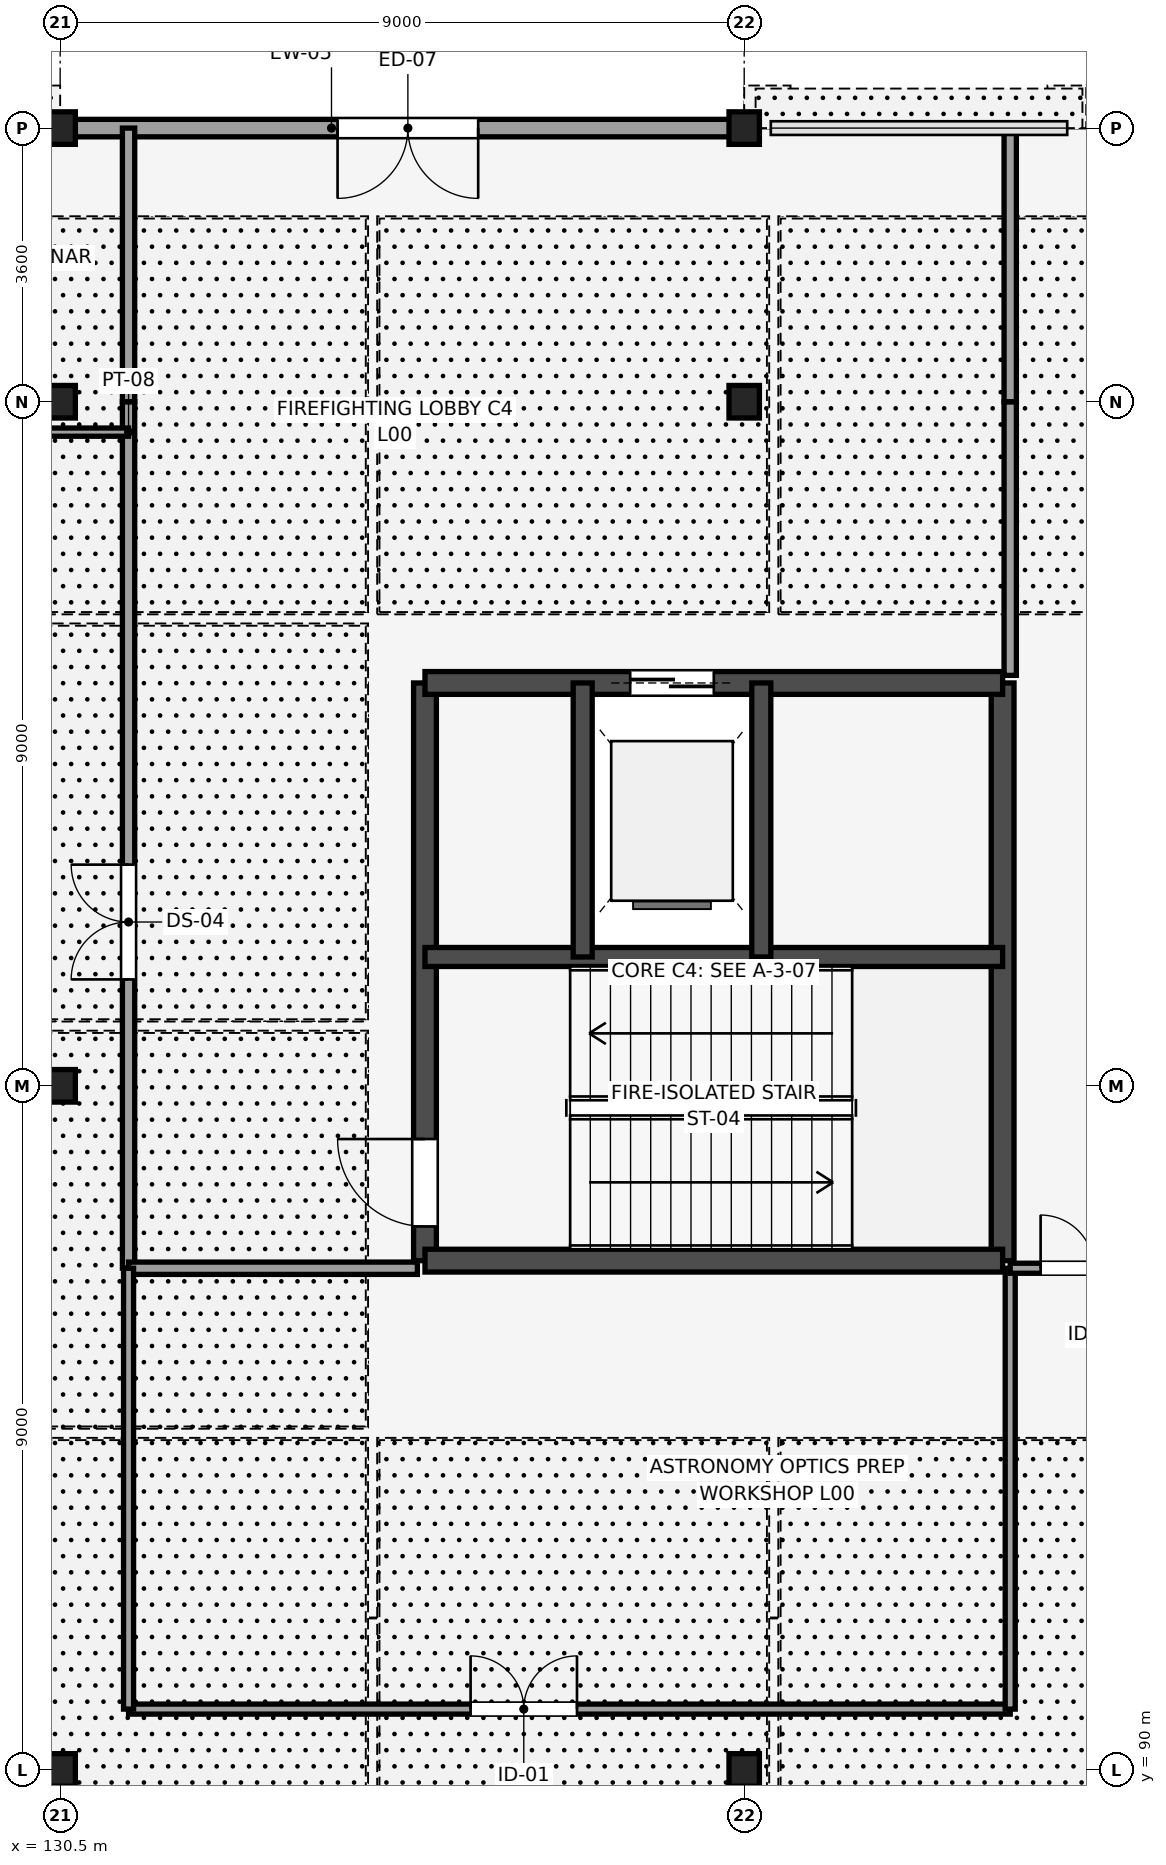
"""IFC4 building model, lengths in metres.
Left out: names, types, materials, properties, quantities, classifications, styles, units other than length and angle.
Written with IfcOpenShell. Run it as: python <this file> out.ifc"""

import sys

from ifc_helpers import new_model, si_unit, direction, frame, frame_2d, origin, origin_2d, place, context, subcontext, project, spatial, rectangle, i_section, extrude, element, fill, save


model = new_model("IFC4")
c1 = context("Model", 3, precision=1e-05, world=origin(), true_north=direction((0.0, 1.0)))
c2 = subcontext(c1, "Body", "Model", "MODEL_VIEW")
j1 = project(units=[si_unit("LENGTHUNIT", "METRE"), si_unit("PLANEANGLEUNIT", "RADIAN")], contexts=[c1])
p1 = place(None, origin())
s1 = spatial("IfcSite", under=j1, at=p1, CompositionType="ELEMENT")
p2 = place(p1, origin())
s2 = spatial("IfcBuilding", under=s1, at=p2, CompositionType="ELEMENT")
p3 = place(p2, origin())
s3 = spatial("IfcBuildingStorey", under=s2, at=p3, CompositionType="ELEMENT", Elevation=0.0)
for number, where, z_axis, x_axis in (
    (1, (130.5, 90.0, 0.0), (0.0, 0.0, 1.0), (1.0, 0.0, 0.0)),
    (2, (130.5, 99.0, 0.0), (0.0, 0.0, 1.0), (1.0, 0.0, 0.0)),
    (3, (130.5, 108.0, 0.0), (0.0, 0.0, 1.0), (1.0, 0.0, 0.0)),
    (4, (130.5, 111.6, 0.0), (0.0, 0.0, 1.0), (1.0, 0.0, 0.0)),
    (5, (139.5, 90.0, 0.0), (0.0, 0.0, 1.0), (1.0, 0.0, 0.0)),
    (6, (139.5, 108.0, 0.0), (0.0, 0.0, 1.0), (1.0, 0.0, 0.0)),
    (7, (139.5, 111.6, 0.0), (0.0, 0.0, 1.0), (1.0, 0.0, 0.0)),
):
    element("IfcColumn", number, at=place(p3, frame(where, z_axis=z_axis, x_axis=x_axis)), inside=s3, PredefinedType="COLUMN", context=c2, shape_type="SweptSolid", body=[
        extrude(i_section(OverallWidth=0.4, OverallDepth=0.428, WebThickness=0.02, FlangeThickness=0.028, FilletRadius=0.016, at=origin_2d()), origin(), (0.0, 0.0, 1.0), 5.4),
    ])
p4 = place(p3, frame((135.3, 96.7, 0.0), z_axis=(0.0, 0.0, 1.0), x_axis=(0.0, 1.0, 0.0)))
e8 = element("IfcWall", 8, at=p4, inside=s3, PredefinedType="SHEAR", context=c2, shape_type="SweptSolid", body=[
    extrude(rectangle(XDim=7.6, YDim=0.3, at=frame_2d((3.8, 0.0))), origin(), (0.0, 0.0, 1.0), 5.4),
])
p5 = place(p4, frame((0.45, 0.0, 0.0)))
e9 = element("IfcOpeningElement", 9, at=p5, cuts=e8, PredefinedType="OPENING", context=c2, shape_type="SweptSolid", body=[
    extrude(rectangle(XDim=1.15, YDim=2.15, at=frame_2d((0.575, 1.075))), frame((0.0, 0.16, 0.0), z_axis=(0.0, -1.0, 0.0), x_axis=(1.0, 0.0, 0.0)), (0.0, 0.0, 1.0), 0.32),
])
p6 = place(p3, frame((142.9, 96.7, 0.0), z_axis=(0.0, 0.0, 1.0), x_axis=(0.0, 1.0, 0.0)))
e10 = element("IfcWall", 10, at=p6, inside=s3, PredefinedType="SHEAR", context=c2, shape_type="SweptSolid", body=[
    extrude(rectangle(XDim=7.6, YDim=0.3, at=frame_2d((3.8, 0.0))), origin(), (0.0, 0.0, 1.0), 5.4),
])
p7 = place(p3, frame((135.3, 96.7, 0.0), z_axis=(0.0, 0.0, 1.0), x_axis=(1.0, 0.0, 0.0)))
e11 = element("IfcWall", 11, at=p7, inside=s3, PredefinedType="SHEAR", context=c2, shape_type="SweptSolid", body=[
    extrude(rectangle(XDim=7.6, YDim=0.3, at=frame_2d((3.8, 0.0))), origin(), (0.0, 0.0, 1.0), 5.4),
])
p8 = place(p3, frame((135.3, 104.3, 0.0), z_axis=(0.0, 0.0, 1.0), x_axis=(1.0, 0.0, 0.0)))
e12 = element("IfcWall", 12, at=p8, inside=s3, PredefinedType="SHEAR", context=c2, shape_type="SweptSolid", body=[
    extrude(rectangle(XDim=7.6, YDim=0.3, at=frame_2d((3.8, 0.0))), origin(), (0.0, 0.0, 1.0), 5.4),
])
p9 = place(p8, frame((2.7, 0.0, 0.0)))
e13 = element("IfcOpeningElement", 13, at=p9, cuts=e12, PredefinedType="OPENING", context=c2, shape_type="SweptSolid", body=[
    extrude(rectangle(XDim=1.1, YDim=2.2, at=frame_2d((0.55, 1.1))), frame((0.0, 0.16, 0.0), z_axis=(0.0, -1.0, 0.0), x_axis=(1.0, 0.0, 0.0)), (0.0, 0.0, 1.0), 0.32),
])
p10 = place(p3, frame((135.3, 100.695, 0.0), z_axis=(0.0, 0.0, 1.0), x_axis=(1.0, 0.0, 0.0)))
e14 = element("IfcWall", 14, at=p10, inside=s3, PredefinedType="SHEAR", context=c2, shape_type="SweptSolid", body=[
    extrude(rectangle(XDim=7.6, YDim=0.25, at=frame_2d((3.8, 0.0))), origin(), (0.0, 0.0, 1.0), 5.4),
])
for number, where, z_axis, x_axis in (
    (15, (137.375, 100.695, 0.0), (0.0, 0.0, 1.0), (0.0, 1.0, 0.0)),
    (16, (139.725, 100.695, 0.0), (0.0, 0.0, 1.0), (0.0, 1.0, 0.0)),
):
    element("IfcWall", number, at=place(p3, frame(where, z_axis=z_axis, x_axis=x_axis)), inside=s3, PredefinedType="SHEAR", context=c2, shape_type="SweptSolid", body=[
        extrude(rectangle(XDim=3.605, YDim=0.25, at=frame_2d((1.802, 0.0))), origin(), (0.0, 0.0, 1.0), 5.4),
    ])
p11 = place(p3, frame((139.5, 111.6, 0.0), z_axis=(0.0, 0.0, 1.0), x_axis=(-1.0, 0.0, 0.0)))
e17 = element("IfcWall", 17, at=p11, inside=s3, PredefinedType="STANDARD", context=c2, shape_type="SweptSolid", body=[
    extrude(rectangle(XDim=9.0, YDim=0.23, at=frame_2d((4.5, 0.0))), origin(), (0.0, 0.0, 1.0), 5.22),
])
p12 = place(p11, frame((3.5, 0.0, 0.0)))
e18 = element("IfcOpeningElement", 18, at=p12, cuts=e17, PredefinedType="OPENING", context=c2, shape_type="SweptSolid", body=[
    extrude(rectangle(XDim=1.85, YDim=2.2, at=frame_2d((0.925, 1.1))), frame((0.0, 0.125, 0.0), z_axis=(0.0, -1.0, 0.0), x_axis=(1.0, 0.0, 0.0)), (0.0, 0.0, 1.0), 0.25),
])
p13 = place(p3, frame((131.4, 96.6, 0.0), z_axis=(0.0, 0.0, 1.0), x_axis=(0.0, 1.0, 0.0)))
e19 = element("IfcWall", 19, at=p13, inside=s3, PredefinedType="PARTITIONING", context=c2, shape_type="SweptSolid", body=[
    extrude(rectangle(XDim=11.4, YDim=0.162, at=frame_2d((5.7, 0.0))), origin(), (0.0, 0.0, 1.0), 5.22),
])
p14 = place(p13, frame((3.8, 0.0, 0.0)))
e20 = element("IfcOpeningElement", 20, at=p14, cuts=e19, PredefinedType="OPENING", context=c2, shape_type="SweptSolid", body=[
    extrude(rectangle(XDim=1.51, YDim=2.15, at=frame_2d((0.755, 1.075))), frame((0.0, 0.091, 0.0), z_axis=(0.0, -1.0, 0.0), x_axis=(1.0, 0.0, 0.0)), (0.0, 0.0, 1.0), 0.182),
])
p15 = place(p3, frame((131.4, 96.6, 0.0), z_axis=(0.0, 0.0, 1.0), x_axis=(1.0, 0.0, 0.0)))
e21 = element("IfcWall", 21, at=p15, inside=s3, PredefinedType="PARTITIONING", context=c2, shape_type="SweptSolid", body=[
    extrude(rectangle(XDim=3.8, YDim=0.162, at=frame_2d((1.9, 0.0))), origin(), (0.0, 0.0, 1.0), 5.22),
])
for number, where, z_axis, x_axis in (
    (22, (143.0, 104.4, 0.0), (0.0, 0.0, 1.0), (0.0, 1.0, 0.0)),
    (23, (131.4, 108.0, 0.0), (0.0, 0.0, 1.0), (0.0, 1.0, 0.0)),
):
    element("IfcWall", number, at=place(p3, frame(where, z_axis=z_axis, x_axis=x_axis)), inside=s3, PredefinedType="PARTITIONING", context=c2, shape_type="SweptSolid", body=[
        extrude(rectangle(XDim=3.6, YDim=0.162, at=frame_2d((1.8, 0.0))), origin(), (0.0, 0.0, 1.0), 5.22),
    ])
p16 = place(p3, frame((116.8, 107.6, 0.0), z_axis=(0.0, 0.0, 1.0), x_axis=(1.0, 0.0, 0.0)))
e24 = element("IfcWall", 24, at=p16, inside=s3, PredefinedType="PARTITIONING", context=c2, shape_type="SweptSolid", body=[
    extrude(rectangle(XDim=14.6, YDim=0.108, at=frame_2d((7.3, 0.0))), origin(), (0.0, 0.0, 1.0), 5.22),
])
p17 = place(p16, frame((5.8, 0.0, 0.0)))
e25 = element("IfcOpeningElement", 25, at=p17, cuts=e24, PredefinedType="OPENING", context=c2, shape_type="SweptSolid", body=[
    extrude(rectangle(XDim=1.4, YDim=2.2, at=frame_2d((0.7, 1.1))), frame((0.0, 0.064, 0.0), z_axis=(0.0, -1.0, 0.0), x_axis=(1.0, 0.0, 0.0)), (0.0, 0.0, 1.0), 0.128),
])
p18 = place(p3, frame((131.4, 90.8, 0.0), z_axis=(0.0, 0.0, 1.0), x_axis=(1.0, 0.0, 0.0)))
e26 = element("IfcWall", 26, at=p18, inside=s3, PredefinedType="PARTITIONING", context=c2, shape_type="SweptSolid", body=[
    extrude(rectangle(XDim=11.6, YDim=0.132, at=frame_2d((5.8, 0.0))), origin(), (0.0, 0.0, 1.0), 5.22),
])
p19 = place(p18, frame((4.5, 0.0, 0.0)))
e27 = element("IfcOpeningElement", 27, at=p19, cuts=e26, PredefinedType="OPENING", context=c2, shape_type="SweptSolid", body=[
    extrude(rectangle(XDim=1.4, YDim=2.2, at=frame_2d((0.7, 1.1))), frame((0.0, 0.076, 0.0), z_axis=(0.0, -1.0, 0.0), x_axis=(1.0, 0.0, 0.0)), (0.0, 0.0, 1.0), 0.152),
])
for number, where, z_axis, x_axis in (
    (28, (131.4, 90.8, 0.0), (0.0, 0.0, 1.0), (0.0, 1.0, 0.0)),
    (29, (143.0, 90.8, 0.0), (0.0, 0.0, 1.0), (0.0, 1.0, 0.0)),
):
    element("IfcWall", number, at=place(p3, frame(where, z_axis=z_axis, x_axis=x_axis)), inside=s3, PredefinedType="PARTITIONING", context=c2, shape_type="SweptSolid", body=[
        extrude(rectangle(XDim=5.8, YDim=0.132, at=frame_2d((2.9, 0.0))), origin(), (0.0, 0.0, 1.0), 5.22),
    ])
p20 = place(p3, frame((143.0, 96.6, 0.0), z_axis=(0.0, 0.0, 1.0), x_axis=(1.0, 0.0, 0.0)))
e30 = element("IfcWall", 30, at=p20, inside=s3, PredefinedType="PARTITIONING", context=c2, shape_type="SweptSolid", body=[
    extrude(rectangle(XDim=2.2, YDim=0.132, at=frame_2d((1.1, 0.0))), origin(), (0.0, 0.0, 1.0), 5.22),
])
p21 = place(p20, frame((0.4, 0.0, 0.0)))
e31 = element("IfcOpeningElement", 31, at=p21, cuts=e30, PredefinedType="OPENING", context=c2, shape_type="SweptSolid", body=[
    extrude(rectangle(XDim=1.4, YDim=2.2, at=frame_2d((0.7, 1.1))), frame((0.0, 0.076, 0.0), z_axis=(0.0, -1.0, 0.0), x_axis=(1.0, 0.0, 0.0)), (0.0, 0.0, 1.0), 0.152),
])
p22 = place(p3, frame((143.0, 108.0, 0.0), z_axis=(0.0, 0.0, 1.0), x_axis=(0.0, 1.0, 0.0)))
e32 = element("IfcWall", 32, at=p22, inside=s3, PredefinedType="PARTITIONING", context=c2, shape_type="SweptSolid", body=[
    extrude(rectangle(XDim=3.6, YDim=0.162, at=frame_2d((1.8, 0.0))), origin(), (0.0, 0.0, 1.0), 5.22),
])
p23 = place(p12, origin())
e33 = element("IfcDoor", 33, at=p23, inside=s3, OperationType="DOUBLE_DOOR_SINGLE_SWING", PredefinedType="DOOR", context=c2, shape_type="SweptSolid", body=[
    extrude(rectangle(XDim=1.85, YDim=2.2, at=frame_2d((0.925, 1.1))), frame((0.0, 0.025, 0.0), z_axis=(0.0, -1.0, 0.0), x_axis=(1.0, 0.0, 0.0)), (0.0, 0.0, 1.0), 0.05),
])
fill(e18, e33)
p24 = place(p5, origin())
e34 = element("IfcDoor", 34, at=p24, inside=s3, OperationType="SINGLE_SWING_RIGHT", PredefinedType="DOOR", context=c2, shape_type="SweptSolid", body=[
    extrude(rectangle(XDim=1.15, YDim=2.15, at=frame_2d((0.575, 1.075))), frame((0.0, 0.025, 0.0), z_axis=(0.0, -1.0, 0.0), x_axis=(1.0, 0.0, 0.0)), (0.0, 0.0, 1.0), 0.05),
])
fill(e9, e34)
p25 = place(p9, origin())
e35 = element("IfcDoor", 35, at=p25, inside=s3, OperationType="DOUBLE_DOOR_SLIDING", PredefinedType="DOOR", context=c2, shape_type="SweptSolid", body=[
    extrude(rectangle(XDim=1.1, YDim=2.2, at=frame_2d((0.55, 1.1))), frame((0.0, 0.025, 0.0), z_axis=(0.0, -1.0, 0.0), x_axis=(1.0, 0.0, 0.0)), (0.0, 0.0, 1.0), 0.05),
])
fill(e13, e35)
p26 = place(p14, origin())
e36 = element("IfcDoor", 36, at=p26, inside=s3, OperationType="DOUBLE_DOOR_SINGLE_SWING", PredefinedType="DOOR", context=c2, shape_type="SweptSolid", body=[
    extrude(rectangle(XDim=1.51, YDim=2.15, at=frame_2d((0.755, 1.075))), frame((0.0, 0.025, 0.0), z_axis=(0.0, -1.0, 0.0), x_axis=(1.0, 0.0, 0.0)), (0.0, 0.0, 1.0), 0.05),
])
fill(e20, e36)
p27 = place(p19, origin())
e37 = element("IfcDoor", 37, at=p27, inside=s3, OperationType="DOUBLE_DOOR_SINGLE_SWING", PredefinedType="DOOR", context=c2, shape_type="SweptSolid", body=[
    extrude(rectangle(XDim=1.4, YDim=2.2, at=frame_2d((0.7, 1.1))), frame((0.0, 0.025, 0.0), z_axis=(0.0, -1.0, 0.0), x_axis=(1.0, 0.0, 0.0)), (0.0, 0.0, 1.0), 0.05),
])
fill(e27, e37)
p28 = place(p21, origin())
e38 = element("IfcDoor", 38, at=p28, inside=s3, OperationType="DOUBLE_DOOR_SINGLE_SWING", PredefinedType="DOOR", context=c2, shape_type="SweptSolid", body=[
    extrude(rectangle(XDim=1.4, YDim=2.2, at=frame_2d((0.7, 1.1))), frame((0.0, 0.025, 0.0), z_axis=(0.0, -1.0, 0.0), x_axis=(1.0, 0.0, 0.0)), (0.0, 0.0, 1.0), 0.05),
])
fill(e31, e38)
save(model, sys.argv[1])
